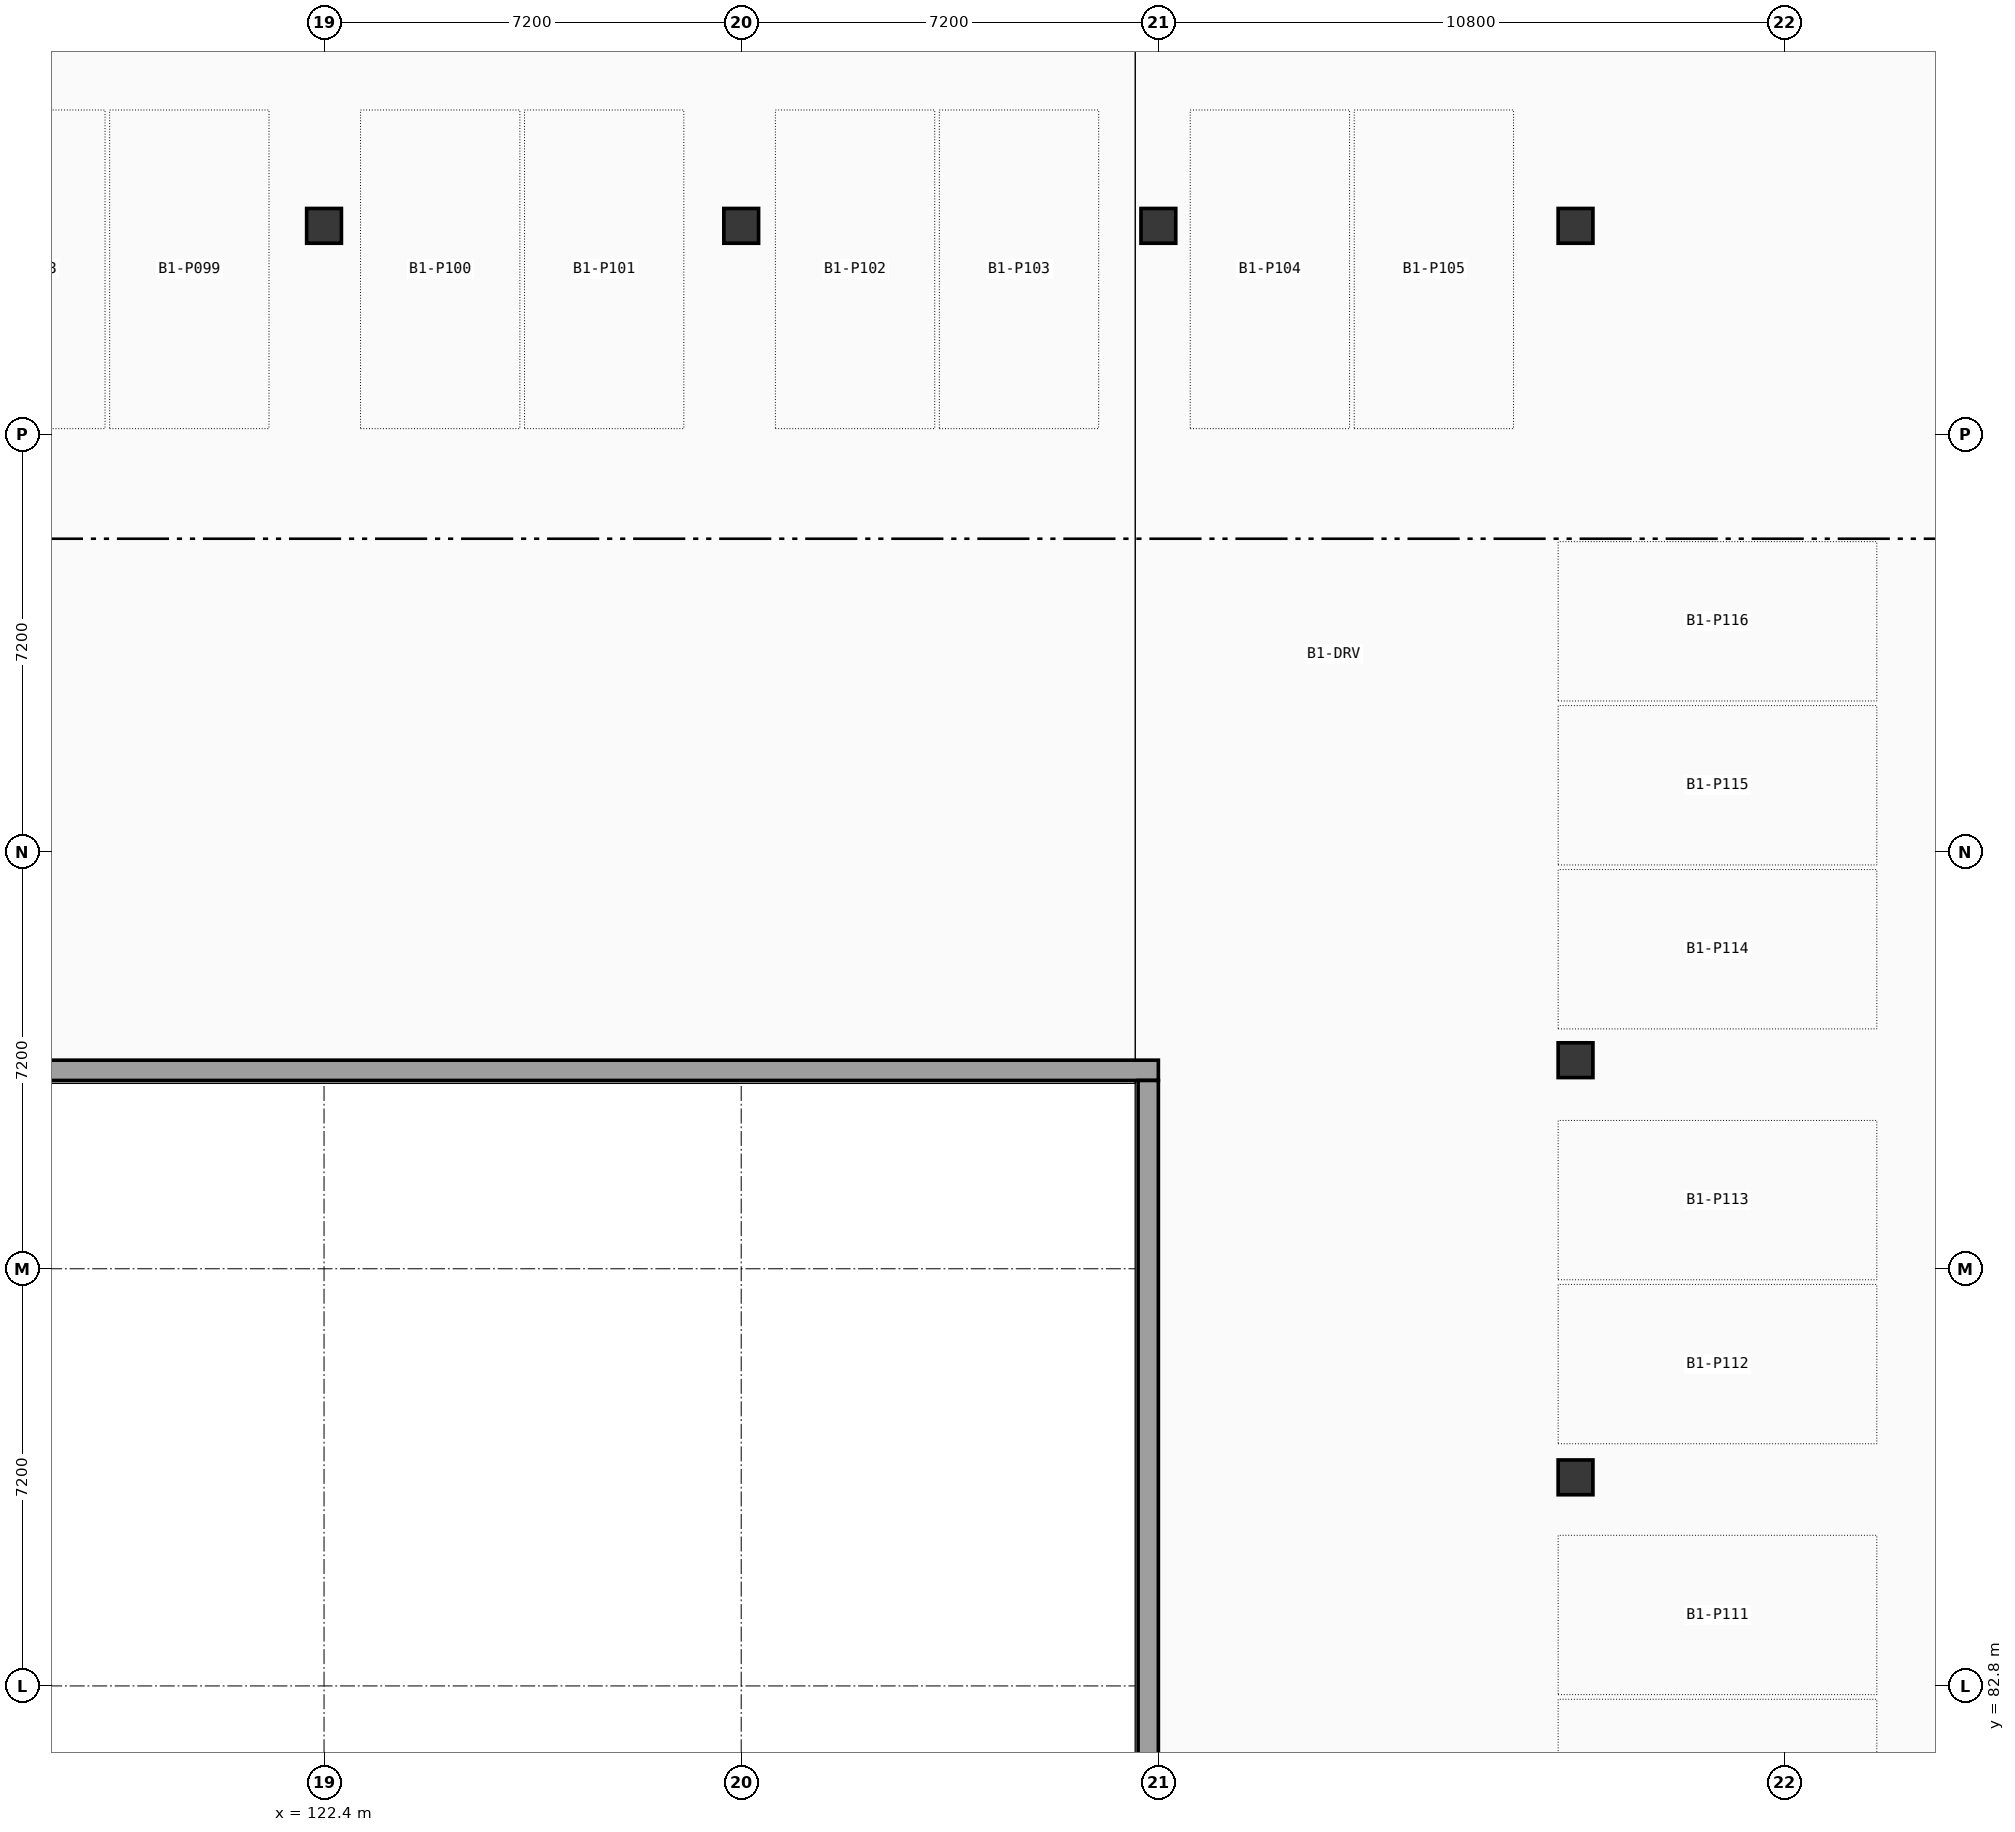
"""IFC4 building model, lengths in metres.
Left out: names, types, materials, properties, quantities, classifications, styles, units other than length and angle.
Written with IfcOpenShell. Run it as: python <this file> out.ifc"""

import sys

from ifc_helpers import new_model, si_unit, direction, frame, frame_2d, origin, origin_2d, place, context, subcontext, project, spatial, rectangle, extrude, element, save


model = new_model("IFC4")
c1 = context("Model", 3, precision=1e-05, world=origin(), true_north=direction((0.0, 1.0)))
c2 = subcontext(c1, "Body", "Model", "MODEL_VIEW")
j1 = project(units=[si_unit("LENGTHUNIT", "METRE"), si_unit("PLANEANGLEUNIT", "RADIAN")], contexts=[c1])
p1 = place(None, origin())
s1 = spatial("IfcSite", under=j1, at=p1, CompositionType="ELEMENT")
p2 = place(p1, origin())
s2 = spatial("IfcBuilding", under=s1, at=p2, CompositionType="ELEMENT")
p3 = place(p2, frame((0.0, 0.0, -4.2)))
s3 = spatial("IfcBuildingStorey", under=s2, at=p3, CompositionType="ELEMENT", Elevation=-4.2)
for number, where, z_axis, x_axis in (
    (1, (122.4, 108.0, 0.0), (0.0, 0.0, 1.0), (1.0, 0.0, 0.0)),
    (2, (129.6, 108.0, 0.0), (0.0, 0.0, 1.0), (1.0, 0.0, 0.0)),
    (3, (136.8, 108.0, 0.0), (0.0, 0.0, 1.0), (1.0, 0.0, 0.0)),
    (4, (144.0, 86.4, 0.0), (0.0, 0.0, 1.0), (1.0, 0.0, 0.0)),
    (5, (144.0, 93.6, 0.0), (0.0, 0.0, 1.0), (1.0, 0.0, 0.0)),
    (6, (144.0, 108.0, 0.0), (0.0, 0.0, 1.0), (1.0, 0.0, 0.0)),
):
    element("IfcColumn", number, at=place(p3, frame(where, z_axis=z_axis, x_axis=x_axis)), inside=s3, PredefinedType="COLUMN", context=c2, shape_type="SweptSolid", body=[
        extrude(rectangle(XDim=0.6, YDim=0.6, at=origin_2d()), origin(), (0.0, 0.0, 1.0), 4.2),
    ])
p4 = place(p3, frame((36.0, 93.425, 0.0), z_axis=(0.0, 0.0, 1.0), x_axis=(1.0, 0.0, 0.0)))
e7 = element("IfcWall", 7, at=p4, inside=s3, PredefinedType="SOLIDWALL", context=c2, shape_type="SweptSolid", body=[
    extrude(rectangle(XDim=100.8, YDim=0.35, at=frame_2d((50.4, 0.0))), origin(), (0.0, 0.0, 1.0), 3.92),
])
p5 = place(p3, frame((136.625, 61.55, 0.0), z_axis=(0.0, 0.0, 1.0), x_axis=(0.0, 1.0, 0.0)))
e8 = element("IfcWall", 8, at=p5, inside=s3, PredefinedType="SOLIDWALL", context=c2, shape_type="SweptSolid", body=[
    extrude(rectangle(XDim=31.7, YDim=0.35, at=frame_2d((15.85, 0.0))), origin(), (0.0, 0.0, 1.0), 3.92),
])
save(model, sys.argv[1])
